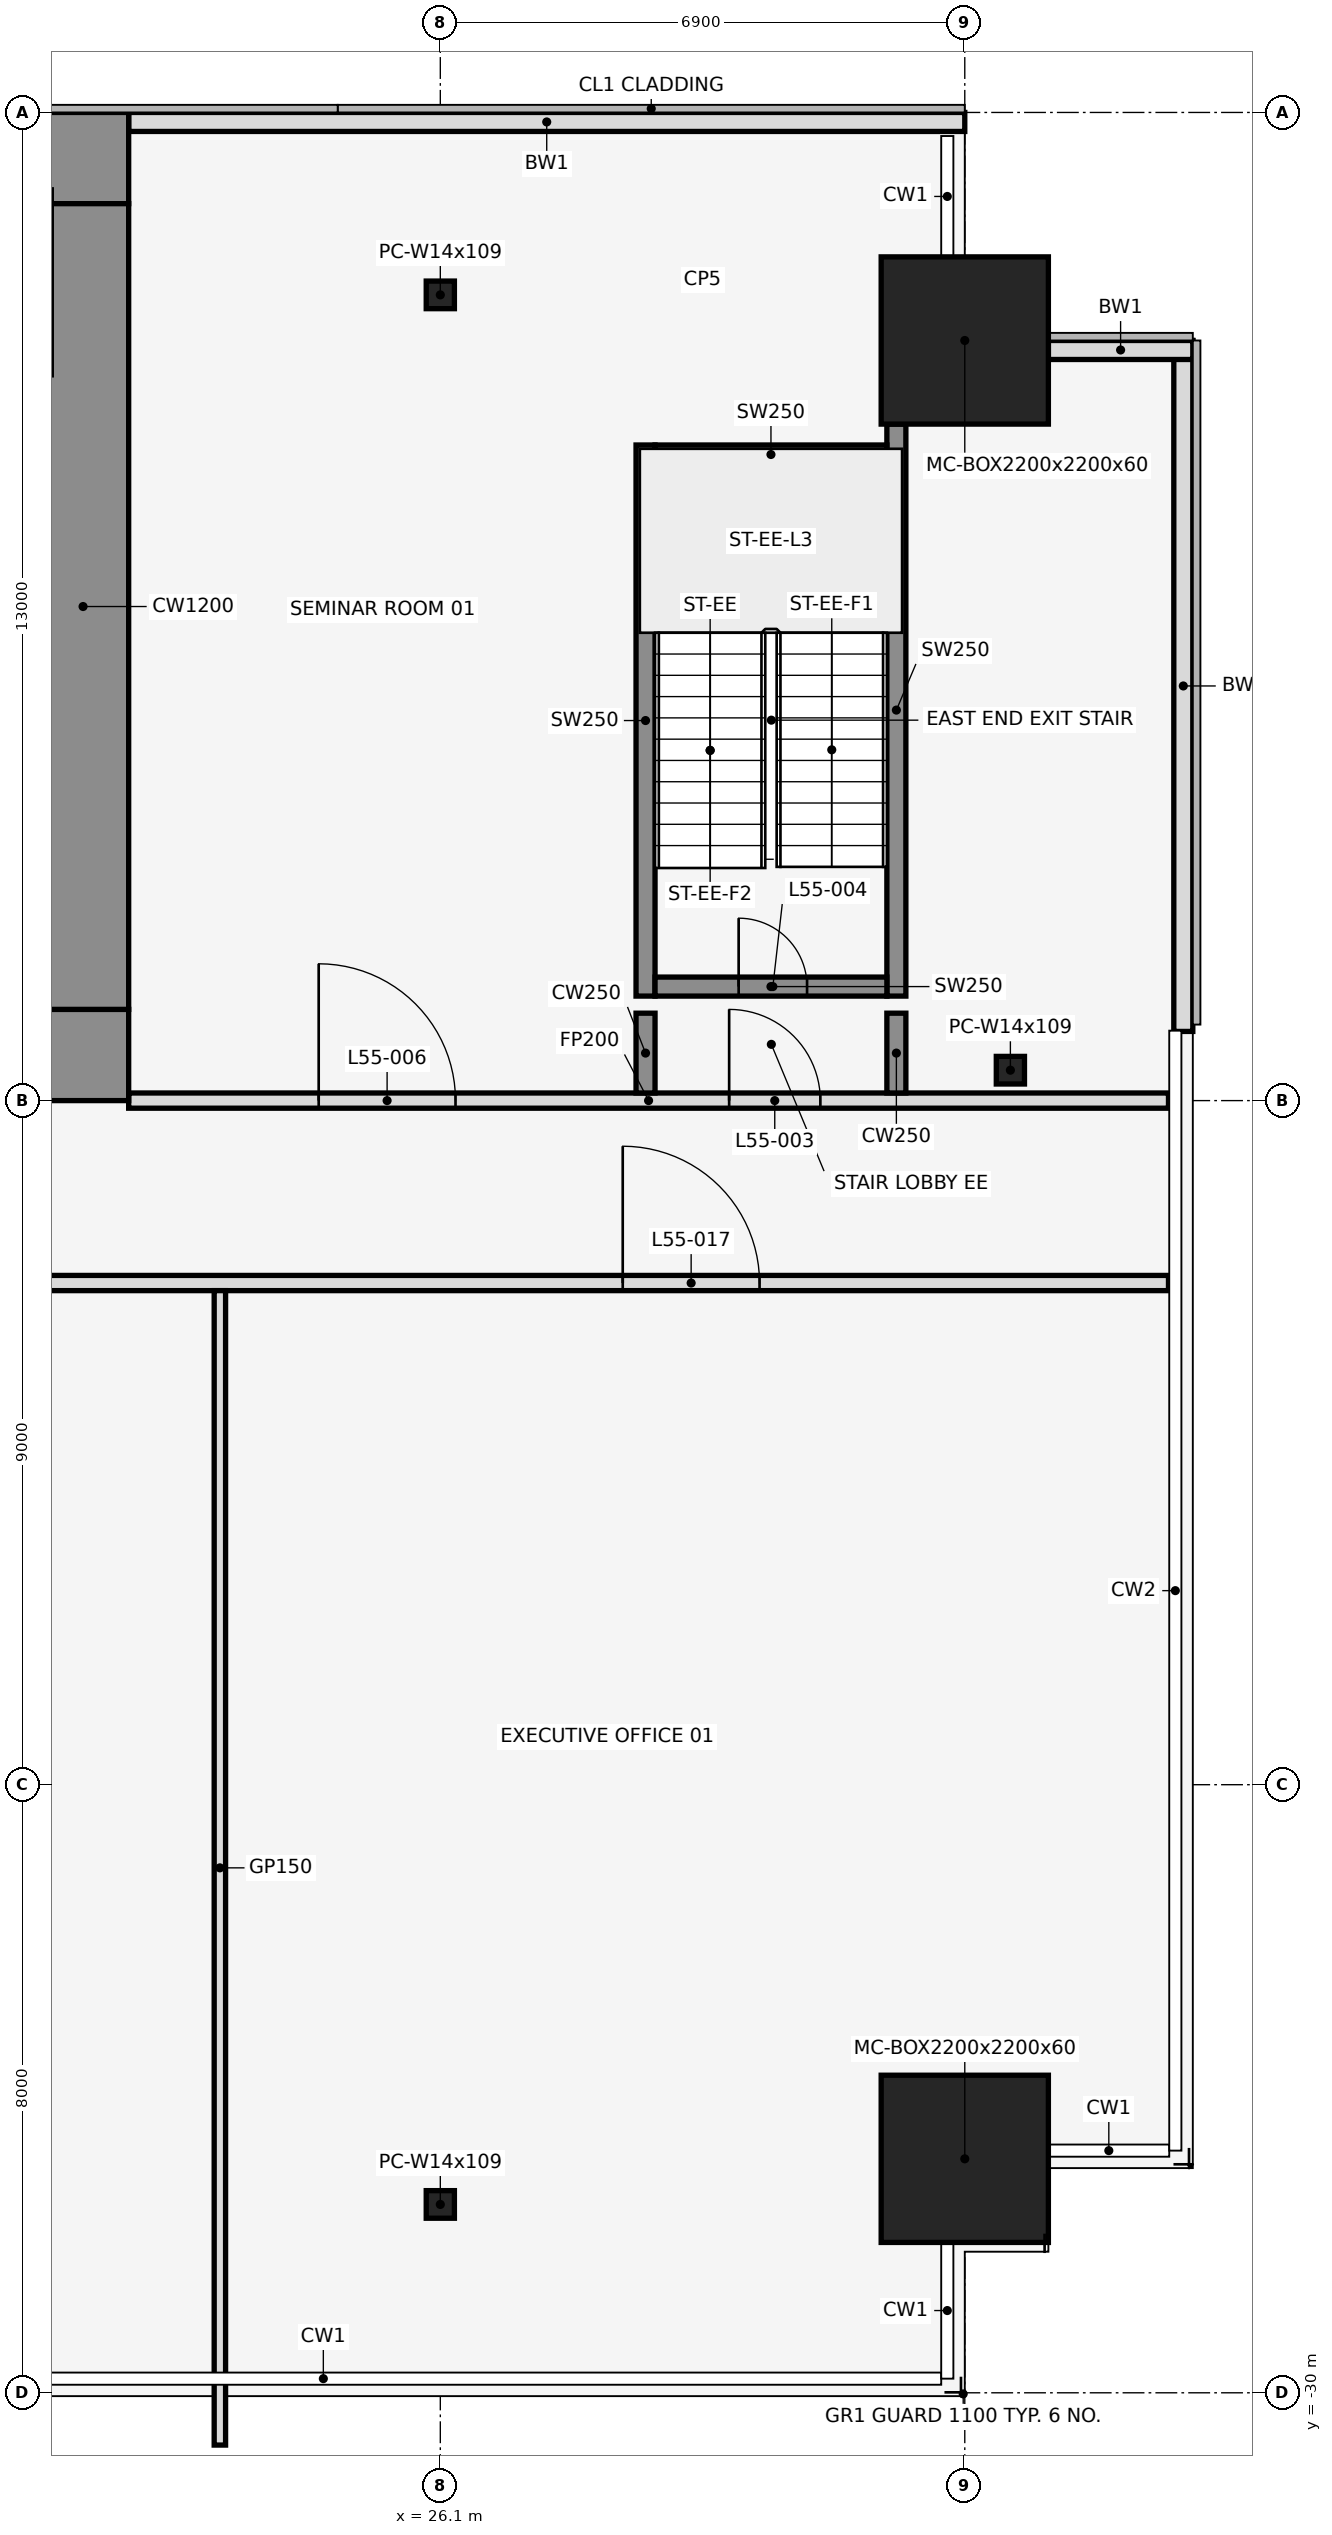
"""IFC4 building model, lengths in metres.
Left out: names, types, materials, properties, quantities, classifications, styles, units other than length and angle.
Written with IfcOpenShell. Run it as: python <this file> out.ifc"""

import sys

from ifc_helpers import new_model, si_unit, direction, frame, frame_2d, origin, origin_2d, place, context, subcontext, project, spatial, rectangle, hollow_rectangle, i_section, extrude, element, fill, save


model = new_model("IFC4")
c1 = context("Model", 3, precision=1e-05, world=origin(), true_north=direction((0.0, 1.0)))
c2 = subcontext(c1, "Body", "Model", "MODEL_VIEW")
j1 = project(units=[si_unit("LENGTHUNIT", "METRE"), si_unit("PLANEANGLEUNIT", "RADIAN")], contexts=[c1])
p1 = place(None, origin())
s1 = spatial("IfcSite", under=j1, at=p1, CompositionType="ELEMENT")
p2 = place(p1, origin())
s2 = spatial("IfcBuilding", under=s1, at=p2, CompositionType="ELEMENT")
p3 = place(p2, frame((0.0, 0.0, 245.6)))
s3 = spatial("IfcBuildingStorey", under=s2, at=p3, CompositionType="ELEMENT", Elevation=245.6)
for number, where, z_axis, x_axis in (
    (1, (26.1, -27.522, 0.0), (0.0, 0.0, 1.0), (1.0, 0.0, 0.0)),
    (2, (26.1, -2.4, 0.0), (0.0, 0.0, 1.0), (1.0, 0.0, 0.0)),
):
    element("IfcColumn", number, at=place(p3, frame(where, z_axis=z_axis, x_axis=x_axis)), inside=s3, PredefinedType="COLUMN", context=c2, shape_type="SweptSolid", body=[
        extrude(i_section(OverallWidth=0.371, OverallDepth=0.363, WebThickness=0.013, FlangeThickness=0.022, at=origin_2d()), origin(), (0.0, 0.0, 1.0), 4.2),
    ])
for number, where, z_axis, x_axis in (
    (3, (33.0, -26.922, 0.0), (0.0, 0.0, 1.0), (1.0, 0.0, 0.0)),
    (4, (33.0, -3.0, 0.0), (0.0, 0.0, 1.0), (1.0, 0.0, 0.0)),
):
    element("IfcColumn", number, at=place(p3, frame(where, z_axis=z_axis, x_axis=x_axis)), inside=s3, PredefinedType="COLUMN", context=c2, shape_type="SweptSolid", body=[
        extrude(hollow_rectangle(XDim=2.2, YDim=2.2, WallThickness=0.06, at=origin_2d()), origin(), (0.0, 0.0, 1.0), 4.2),
    ])
p4 = place(p3, frame((33.6, -12.6, 0.0), z_axis=(0.0, 0.0, 1.0), x_axis=(1.0, 0.0, 0.0)))
e5 = element("IfcColumn", 5, at=p4, inside=s3, PredefinedType="COLUMN", context=c2, shape_type="SweptSolid", body=[
    extrude(i_section(OverallWidth=0.371, OverallDepth=0.363, WebThickness=0.013, FlangeThickness=0.022, at=origin_2d()), origin(), (0.0, 0.0, 1.0), 4.2),
])
p5 = place(p3, frame((33.0, -0.125, 0.0), z_axis=(0.0, 0.0, 1.0), x_axis=(-1.0, 0.0, 0.0)))
e6 = element("IfcWall", 6, at=p5, inside=s3, PredefinedType="STANDARD", context=c2, shape_type="SweptSolid", body=[
    extrude(rectangle(XDim=11.0, YDim=0.25, at=frame_2d((5.5, 0.0))), origin(), (0.0, 0.0, 1.0), 4.05),
])
p6 = place(p3, frame((35.875, -12.09, 0.0), z_axis=(0.0, 0.0, 1.0), x_axis=(0.0, 1.0, 0.0)))
e7 = element("IfcWall", 7, at=p6, inside=s3, PredefinedType="STANDARD", context=c2, shape_type="SweptSolid", body=[
    extrude(rectangle(XDim=9.09, YDim=0.25, at=frame_2d((4.545, 0.0))), origin(), (0.0, 0.0, 1.0), 4.05),
])
p7 = place(p3, frame((36.0, -3.125, 0.0), z_axis=(0.0, 0.0, 1.0), x_axis=(-1.0, 0.0, 0.0)))
e8 = element("IfcWall", 8, at=p7, inside=s3, PredefinedType="STANDARD", context=c2, shape_type="SweptSolid", body=[
    extrude(rectangle(XDim=1.9, YDim=0.25, at=frame_2d((0.95, 0.0))), origin(), (0.0, 0.0, 1.0), 4.05),
])
p8 = place(p3, frame((28.8, -11.625, 0.0), z_axis=(0.0, 0.0, 1.0), x_axis=(0.0, 1.0, 0.0)))
e9 = element("IfcWall", 9, at=p8, inside=s3, PredefinedType="SHEAR", context=c2, shape_type="SweptSolid", body=[
    extrude(rectangle(XDim=7.25, YDim=0.25, at=frame_2d((3.625, 0.0))), origin(), (0.0, 0.0, 1.0), 4.2),
])
p9 = place(p3, frame((32.1, -11.625, 0.0), z_axis=(0.0, 0.0, 1.0), x_axis=(0.0, 1.0, 0.0)))
e10 = element("IfcWall", 10, at=p9, inside=s3, PredefinedType="SHEAR", context=c2, shape_type="SweptSolid", body=[
    extrude(rectangle(XDim=7.525, YDim=0.25, at=frame_2d((3.762, 0.0))), origin(), (0.0, 0.0, 1.0), 4.2),
])
p10 = place(p3, frame((28.925, -11.5, 0.0), z_axis=(0.0, 0.0, 1.0), x_axis=(1.0, 0.0, 0.0)))
e11 = element("IfcWall", 11, at=p10, inside=s3, PredefinedType="SHEAR", context=c2, shape_type="SweptSolid", body=[
    extrude(rectangle(XDim=3.05, YDim=0.25, at=frame_2d((1.525, 0.0))), origin(), (0.0, 0.0, 1.0), 4.2),
])
p11 = place(p10, frame((1.1, 0.0, 0.0)))
e12 = element("IfcOpeningElement", 12, at=p11, cuts=e11, PredefinedType="OPENING", context=c2, shape_type="SweptSolid", body=[
    extrude(rectangle(XDim=0.9, YDim=2.1, at=frame_2d((0.45, 1.05))), frame((0.0, 0.137, 0.0), z_axis=(0.0, -1.0, 0.0), x_axis=(1.0, 0.0, 0.0)), (0.0, 0.0, 1.0), 0.274),
])
p12 = place(p3, frame((28.925, -4.5, 0.0), z_axis=(0.0, 0.0, 1.0), x_axis=(1.0, 0.0, 0.0)))
e13 = element("IfcWall", 13, at=p12, inside=s3, PredefinedType="SHEAR", context=c2, shape_type="SweptSolid", body=[
    extrude(rectangle(XDim=3.05, YDim=0.25, at=frame_2d((1.525, 0.0))), origin(), (0.0, 0.0, 1.0), 4.2),
])
p13 = place(p3, frame((1.4, -15.4, 0.0), z_axis=(0.0, 0.0, 1.0), x_axis=(1.0, 0.0, 0.0)))
e14 = element("IfcWall", 14, at=p13, inside=s3, PredefinedType="PARTITIONING", context=c2, shape_type="SweptSolid", body=[
    extrude(rectangle(XDim=34.28, YDim=0.2, at=frame_2d((17.14, 0.0))), origin(), (0.0, 0.0, 1.0), 3.039),
])
p14 = place(p13, frame((2.8, 0.0, 0.0)))
e15 = element("IfcOpeningElement", 15, at=p14, cuts=e14, PredefinedType="OPENING", context=c2, shape_type="SweptSolid", body=[
    extrude(rectangle(XDim=1.8, YDim=2.1, at=frame_2d((0.9, 1.05))), frame((0.0, 0.112, 0.0), z_axis=(0.0, -1.0, 0.0), x_axis=(1.0, 0.0, 0.0)), (0.0, 0.0, 1.0), 0.224),
])
p15 = place(p13, frame((13.6, 0.0, 0.0)))
e16 = element("IfcOpeningElement", 16, at=p15, cuts=e14, PredefinedType="OPENING", context=c2, shape_type="SweptSolid", body=[
    extrude(rectangle(XDim=1.8, YDim=2.1, at=frame_2d((0.9, 1.05))), frame((0.0, 0.112, 0.0), z_axis=(0.0, -1.0, 0.0), x_axis=(1.0, 0.0, 0.0)), (0.0, 0.0, 1.0), 0.224),
])
p16 = place(p13, frame((27.1, 0.0, 0.0)))
e17 = element("IfcOpeningElement", 17, at=p16, cuts=e14, PredefinedType="OPENING", context=c2, shape_type="SweptSolid", body=[
    extrude(rectangle(XDim=1.8, YDim=2.1, at=frame_2d((0.9, 1.05))), frame((0.0, 0.112, 0.0), z_axis=(0.0, -1.0, 0.0), x_axis=(1.0, 0.0, 0.0)), (0.0, 0.0, 1.0), 0.224),
])
p17 = place(p3, frame((22.0, -13.0, 0.0), z_axis=(0.0, 0.0, 1.0), x_axis=(1.0, 0.0, 0.0)))
e18 = element("IfcWall", 18, at=p17, inside=s3, PredefinedType="PARTITIONING", context=c2, shape_type="SweptSolid", body=[
    extrude(rectangle(XDim=13.68, YDim=0.2, at=frame_2d((6.84, 0.0))), origin(), (0.0, 0.0, 1.0), 3.039),
])
p18 = place(p17, frame((7.9, 0.0, 0.0)))
e19 = element("IfcOpeningElement", 19, at=p18, cuts=e18, PredefinedType="OPENING", context=c2, shape_type="SweptSolid", body=[
    extrude(rectangle(XDim=1.2, YDim=2.1, at=frame_2d((0.6, 1.05))), frame((0.0, 0.112, 0.0), z_axis=(0.0, -1.0, 0.0), x_axis=(1.0, 0.0, 0.0)), (0.0, 0.0, 1.0), 0.224),
])
p19 = place(p17, frame((2.5, 0.0, 0.0)))
e20 = element("IfcOpeningElement", 20, at=p19, cuts=e18, PredefinedType="OPENING", context=c2, shape_type="SweptSolid", body=[
    extrude(rectangle(XDim=1.8, YDim=2.1, at=frame_2d((0.9, 1.05))), frame((0.0, 0.112, 0.0), z_axis=(0.0, -1.0, 0.0), x_axis=(1.0, 0.0, 0.0)), (0.0, 0.0, 1.0), 0.224),
])
p20 = place(p3, frame((23.2, -30.688, 0.0), z_axis=(0.0, 0.0, 1.0), x_axis=(0.0, 1.0, 0.0)))
e21 = element("IfcWall", 21, at=p20, inside=s3, PredefinedType="PARTITIONING", context=c2, shape_type="SweptSolid", body=[
    extrude(rectangle(XDim=15.188, YDim=0.15, at=frame_2d((7.594, 0.0))), origin(), (0.0, 0.0, 1.0), 3.039),
])
for number, where, z_axis, x_axis in (
    (22, (28.8, -12.9, 0.0), (0.0, 0.0, 1.0), (0.0, 1.0, 0.0)),
    (23, (32.1, -12.9, 0.0), (0.0, 0.0, 1.0), (0.0, 1.0, 0.0)),
):
    element("IfcWall", number, at=place(p3, frame(where, z_axis=z_axis, x_axis=x_axis)), inside=s3, PredefinedType="SHEAR", context=c2, shape_type="SweptSolid", body=[
        extrude(rectangle(XDim=1.05, YDim=0.25, at=frame_2d((0.525, 0.0))), origin(), (0.0, 0.0, 1.0), 4.2),
    ])
p21 = place(p3, frame((-22.0, -0.6, 0.0), z_axis=(0.0, 0.0, 1.0), x_axis=(1.0, 0.0, 0.0)))
e24 = element("IfcWall", 24, at=p21, inside=s3, PredefinedType="SHEAR", context=c2, shape_type="SweptSolid", body=[
    extrude(rectangle(XDim=44.0, YDim=1.2, at=frame_2d((22.0, 0.0))), origin(), (0.0, 0.0, 1.0), 4.2),
])
p22 = place(p21, frame((18.55, 0.0, 0.0)))
e25 = element("IfcOpeningElement", 25, at=p22, cuts=e24, PredefinedType="OPENING", context=c2, shape_type="SweptSolid", body=[
    extrude(rectangle(XDim=0.9, YDim=2.1, at=frame_2d((0.45, 1.05))), frame((0.0, 0.612, 0.0), z_axis=(0.0, -1.0, 0.0), x_axis=(1.0, 0.0, 0.0)), (0.0, 0.0, 1.0), 1.224),
])
p23 = place(p21, frame((24.55, 0.0, 0.0)))
e26 = element("IfcOpeningElement", 26, at=p23, cuts=e24, PredefinedType="OPENING", context=c2, shape_type="SweptSolid", body=[
    extrude(rectangle(XDim=0.9, YDim=2.1, at=frame_2d((0.45, 1.05))), frame((0.0, 0.612, 0.0), z_axis=(0.0, -1.0, 0.0), x_axis=(1.0, 0.0, 0.0)), (0.0, 0.0, 1.0), 1.224),
])
p24 = place(p3, frame((-22.0, -12.4, 0.0), z_axis=(0.0, 0.0, 1.0), x_axis=(1.0, 0.0, 0.0)))
e27 = element("IfcWall", 27, at=p24, inside=s3, PredefinedType="SHEAR", context=c2, shape_type="SweptSolid", body=[
    extrude(rectangle(XDim=44.0, YDim=1.2, at=frame_2d((22.0, 0.0))), origin(), (0.0, 0.0, 1.0), 4.2),
])
p25 = place(p24, frame((2.2, 0.0, 0.0)))
e28 = element("IfcOpeningElement", 28, at=p25, cuts=e27, PredefinedType="OPENING", context=c2, shape_type="SweptSolid", body=[
    extrude(rectangle(XDim=1.2, YDim=2.1, at=frame_2d((0.6, 1.05))), frame((0.0, 0.612, 0.0), z_axis=(0.0, -1.0, 0.0), x_axis=(1.0, 0.0, 0.0)), (0.0, 0.0, 1.0), 1.224),
])
p26 = place(p24, frame((21.4, 0.0, 0.0)))
e29 = element("IfcOpeningElement", 29, at=p26, cuts=e27, PredefinedType="OPENING", context=c2, shape_type="SweptSolid", body=[
    extrude(rectangle(XDim=1.2, YDim=2.1, at=frame_2d((0.6, 1.05))), frame((0.0, 0.612, 0.0), z_axis=(0.0, -1.0, 0.0), x_axis=(1.0, 0.0, 0.0)), (0.0, 0.0, 1.0), 1.224),
])
p27 = place(p24, frame((40.6, 0.0, 0.0)))
e30 = element("IfcOpeningElement", 30, at=p27, cuts=e27, PredefinedType="OPENING", context=c2, shape_type="SweptSolid", body=[
    extrude(rectangle(XDim=1.2, YDim=2.1, at=frame_2d((0.6, 1.05))), frame((0.0, 0.612, 0.0), z_axis=(0.0, -1.0, 0.0), x_axis=(1.0, 0.0, 0.0)), (0.0, 0.0, 1.0), 1.224),
])
p28 = place(p24, frame((16.0, 0.0, 0.0)))
e31 = element("IfcOpeningElement", 31, at=p28, cuts=e27, PredefinedType="OPENING", context=c2, shape_type="SweptSolid", body=[
    extrude(rectangle(XDim=1.8, YDim=2.1, at=frame_2d((0.9, 1.05))), frame((0.0, 0.612, 0.0), z_axis=(0.0, -1.0, 0.0), x_axis=(1.0, 0.0, 0.0)), (0.0, 0.0, 1.0), 1.224),
])
p29 = place(p24, frame((6.3, 0.0, 0.0)))
e32 = element("IfcOpeningElement", 32, at=p29, cuts=e27, PredefinedType="OPENING", context=c2, shape_type="SweptSolid", body=[
    extrude(rectangle(XDim=1.2, YDim=2.1, at=frame_2d((0.6, 1.05))), frame((0.0, 0.612, 0.0), z_axis=(0.0, -1.0, 0.0), x_axis=(1.0, 0.0, 0.0)), (0.0, 0.0, 1.0), 1.224),
])
p30 = place(p24, frame((26.2, 0.0, 0.0)))
e33 = element("IfcOpeningElement", 33, at=p30, cuts=e27, PredefinedType="OPENING", context=c2, shape_type="SweptSolid", body=[
    extrude(rectangle(XDim=1.8, YDim=2.1, at=frame_2d((0.9, 1.05))), frame((0.0, 0.612, 0.0), z_axis=(0.0, -1.0, 0.0), x_axis=(1.0, 0.0, 0.0)), (0.0, 0.0, 1.0), 1.224),
])
p31 = place(p24, frame((36.5, 0.0, 0.0)))
e34 = element("IfcOpeningElement", 34, at=p31, cuts=e27, PredefinedType="OPENING", context=c2, shape_type="SweptSolid", body=[
    extrude(rectangle(XDim=1.2, YDim=2.1, at=frame_2d((0.6, 1.05))), frame((0.0, 0.612, 0.0), z_axis=(0.0, -1.0, 0.0), x_axis=(1.0, 0.0, 0.0)), (0.0, 0.0, 1.0), 1.224),
])
p32 = place(p3, frame((21.4, -11.8, 0.0), z_axis=(0.0, 0.0, 1.0), x_axis=(0.0, 1.0, 0.0)))
e35 = element("IfcWall", 35, at=p32, inside=s3, PredefinedType="SHEAR", context=c2, shape_type="SweptSolid", body=[
    extrude(rectangle(XDim=10.6, YDim=1.2, at=frame_2d((5.3, 0.0))), origin(), (0.0, 0.0, 1.0), 4.2),
])
p33 = place(p18, origin())
e36 = element("IfcDoor", 36, at=p33, inside=s3, OperationType="SINGLE_SWING_RIGHT", PredefinedType="DOOR", context=c2, shape_type="SweptSolid", body=[
    extrude(rectangle(XDim=1.2, YDim=2.1, at=frame_2d((0.6, 1.05))), frame((0.0, 0.025, 0.0), z_axis=(0.0, -1.0, 0.0), x_axis=(1.0, 0.0, 0.0)), (0.0, 0.0, 1.0), 0.05),
])
fill(e19, e36)
p34 = place(p11, origin())
e37 = element("IfcDoor", 37, at=p34, inside=s3, OperationType="SINGLE_SWING_LEFT", PredefinedType="DOOR", context=c2, shape_type="SweptSolid", body=[
    extrude(rectangle(XDim=0.9, YDim=2.1, at=frame_2d((0.45, 1.05))), frame((0.0, 0.025, 0.0), z_axis=(0.0, -1.0, 0.0), x_axis=(1.0, 0.0, 0.0)), (0.0, 0.0, 1.0), 0.05),
])
fill(e12, e37)
p35 = place(p19, origin())
e38 = element("IfcDoor", 38, at=p35, inside=s3, OperationType="SINGLE_SWING_LEFT", PredefinedType="DOOR", context=c2, shape_type="SweptSolid", body=[
    extrude(rectangle(XDim=1.8, YDim=2.1, at=frame_2d((0.9, 1.05))), frame((0.0, 0.025, 0.0), z_axis=(0.0, -1.0, 0.0), x_axis=(1.0, 0.0, 0.0)), (0.0, 0.0, 1.0), 0.05),
])
fill(e20, e38)
p36 = place(p16, origin())
e39 = element("IfcDoor", 39, at=p36, inside=s3, OperationType="SINGLE_SWING_LEFT", PredefinedType="DOOR", context=c2, shape_type="SweptSolid", body=[
    extrude(rectangle(XDim=1.8, YDim=2.1, at=frame_2d((0.9, 1.05))), frame((0.0, 0.025, 0.0), z_axis=(0.0, -1.0, 0.0), x_axis=(1.0, 0.0, 0.0)), (0.0, 0.0, 1.0), 0.05),
])
fill(e17, e39)
save(model, sys.argv[1])
